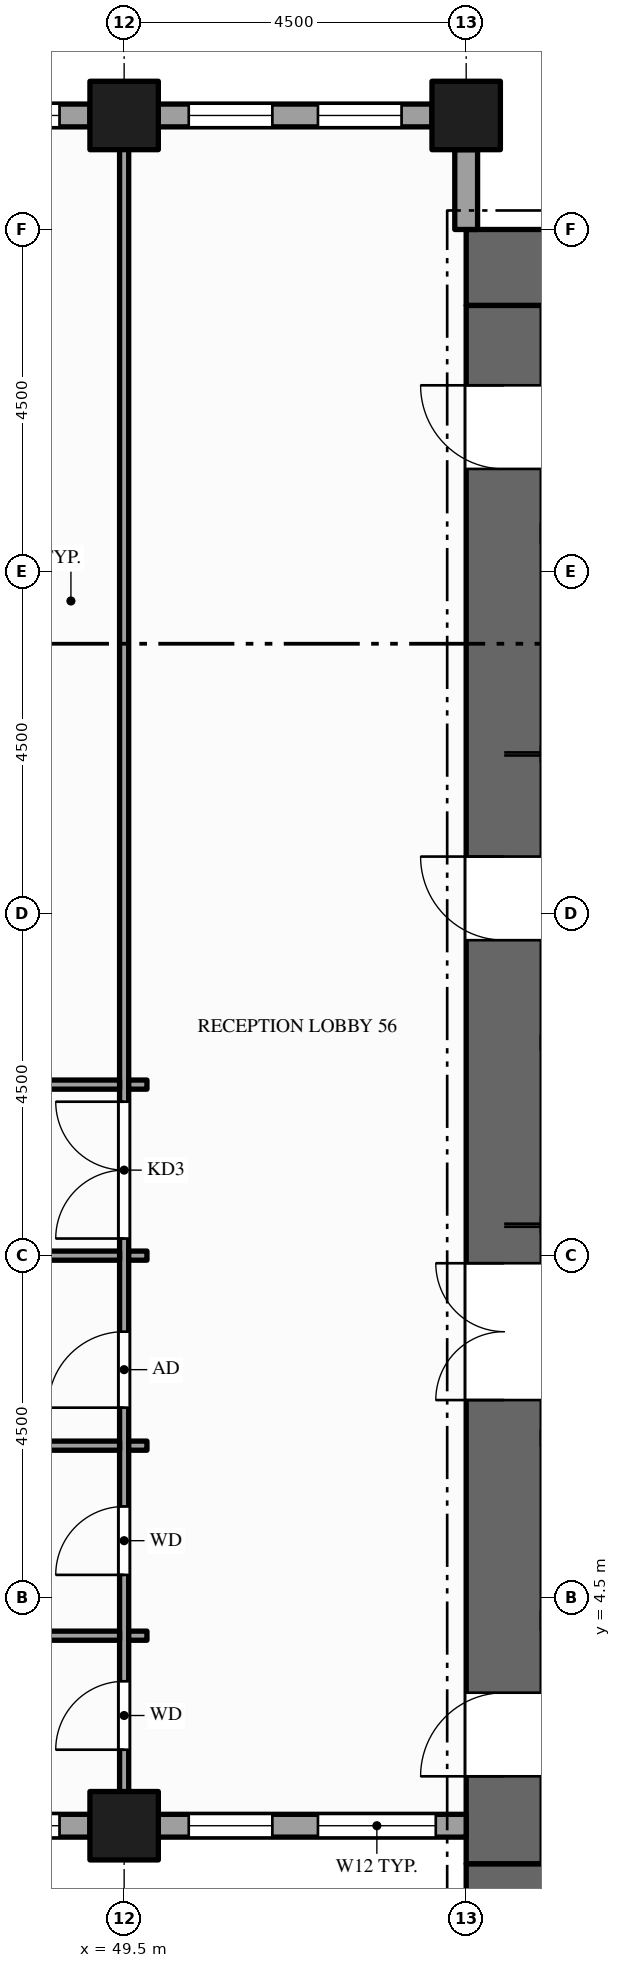
"""IFC4 building model, lengths in metres.
Left out: names, types, materials, properties, quantities, classifications, styles, units other than length and angle.
Written with IfcOpenShell. Run it as: python <this file> out.ifc"""

import sys

from ifc_helpers import new_model, si_unit, direction, frame, frame_2d, origin, origin_2d, place, context, subcontext, project, spatial, rectangle, hollow_rectangle, extrude, element, fill, save


model = new_model("IFC4")
c1 = context("Model", 3, precision=1e-05, world=origin(), true_north=direction((0.0, 1.0)))
c2 = subcontext(c1, "Body", "Model", "MODEL_VIEW")
j1 = project(units=[si_unit("LENGTHUNIT", "METRE"), si_unit("PLANEANGLEUNIT", "RADIAN")], contexts=[c1])
p1 = place(None, origin())
s1 = spatial("IfcSite", under=j1, at=p1, CompositionType="ELEMENT")
p2 = place(p1, origin())
s2 = spatial("IfcBuilding", under=s1, at=p2, CompositionType="ELEMENT")
p3 = place(p2, frame((0.0, 0.0, 151.0)))
s3 = spatial("IfcBuildingStorey", under=s2, at=p3, CompositionType="ELEMENT", Elevation=151.0)
for number, where, z_axis, x_axis in (
    (1, (67.5, 0.5, -0.15), (0.0, 0.0, 1.0), (-1.0, 0.0, 0.0)),
    (2, (54.0, 22.0, -0.15), (0.0, 0.0, 1.0), (1.0, 0.0, 0.0)),
):
    element("IfcWall", number, at=place(p3, frame(where, z_axis=z_axis, x_axis=x_axis)), inside=s3, PredefinedType="SHEAR", context=c2, shape_type="SweptSolid", body=[
        extrude(rectangle(XDim=13.5, YDim=1.0, at=frame_2d((6.75, 0.0))), origin(), (0.0, 0.0, 1.0), 4.0),
    ])
p4 = place(p3, frame((54.5, 1.0, -0.15), z_axis=(0.0, 0.0, 1.0), x_axis=(0.0, 1.0, 0.0)))
e3 = element("IfcWall", 3, at=p4, inside=s3, PredefinedType="SHEAR", context=c2, shape_type="SweptSolid", body=[
    extrude(rectangle(XDim=20.5, YDim=1.0, at=frame_2d((10.25, 0.0))), origin(), (0.0, 0.0, 1.0), 4.0),
])
p5 = place(p4, frame((6.1, 0.0, 0.15)))
e4 = element("IfcOpeningElement", 4, at=p5, cuts=e3, PredefinedType="OPENING", context=c2, shape_type="SweptSolid", body=[
    extrude(rectangle(XDim=1.8, YDim=2.1, at=frame_2d((0.9, 1.05))), frame((0.0, 0.51, 0.0), z_axis=(0.0, -1.0, 0.0), x_axis=(1.0, 0.0, 0.0)), (0.0, 0.0, 1.0), 1.02),
])
p6 = place(p4, frame((12.15, 0.0, 0.15)))
e5 = element("IfcOpeningElement", 5, at=p6, cuts=e3, PredefinedType="OPENING", context=c2, shape_type="SweptSolid", body=[
    extrude(rectangle(XDim=1.1, YDim=2.1, at=frame_2d((0.55, 1.05))), frame((0.0, 0.51, 0.0), z_axis=(0.0, -1.0, 0.0), x_axis=(1.0, 0.0, 0.0)), (0.0, 0.0, 1.0), 1.02),
])
p7 = place(p4, frame((1.15, 0.0, 0.15)))
e6 = element("IfcOpeningElement", 6, at=p7, cuts=e3, PredefinedType="OPENING", context=c2, shape_type="SweptSolid", body=[
    extrude(rectangle(XDim=1.1, YDim=2.1, at=frame_2d((0.55, 1.05))), frame((0.0, 0.51, 0.0), z_axis=(0.0, -1.0, 0.0), x_axis=(1.0, 0.0, 0.0)), (0.0, 0.0, 1.0), 1.02),
])
p8 = place(p4, frame((18.35, 0.0, 0.15)))
e7 = element("IfcOpeningElement", 7, at=p8, cuts=e3, PredefinedType="OPENING", context=c2, shape_type="SweptSolid", body=[
    extrude(rectangle(XDim=1.1, YDim=2.1, at=frame_2d((0.55, 1.05))), frame((0.0, 0.51, 0.0), z_axis=(0.0, -1.0, 0.0), x_axis=(1.0, 0.0, 0.0)), (0.0, 0.0, 1.0), 1.02),
])
for number, where, z_axis, x_axis in (
    (8, (49.5, 1.5, -0.15), (0.0, 0.0, 1.0), (1.0, 0.0, 0.0)),
    (9, (49.5, 24.0, -0.15), (0.0, 0.0, 1.0), (1.0, 0.0, 0.0)),
    (10, (54.0, 24.0, -0.15), (0.0, 0.0, 1.0), (1.0, 0.0, 0.0)),
):
    element("IfcColumn", number, at=place(p3, frame(where, z_axis=z_axis, x_axis=x_axis)), inside=s3, PredefinedType="COLUMN", context=c2, shape_type="SweptSolid", body=[
        extrude(hollow_rectangle(XDim=0.9, YDim=0.9, WallThickness=0.045, at=origin_2d()), origin(), (0.0, 0.0, 1.0), 4.0),
    ])
p9 = place(p3, frame((45.45, 1.5, 0.0), z_axis=(0.0, 0.0, 1.0), x_axis=(1.0, 0.0, 0.0)))
e11 = element("IfcWall", 11, at=p9, inside=s3, PredefinedType="STANDARD", context=c2, shape_type="SweptSolid", body=[
    extrude(rectangle(XDim=3.6, YDim=0.3, at=frame_2d((1.8, 0.0))), origin(), (0.0, 0.0, 1.0), 2.87),
])
p10 = place(p9, frame((0.4, 0.0, 0.9)))
e12 = element("IfcOpeningElement", 12, at=p10, cuts=e11, PredefinedType="OPENING", context=c2, shape_type="SweptSolid", body=[
    extrude(rectangle(XDim=1.1, YDim=1.75, at=frame_2d((0.55, 0.875))), frame((0.0, 0.16, 0.0), z_axis=(0.0, -1.0, 0.0), x_axis=(1.0, 0.0, 0.0)), (0.0, 0.0, 1.0), 0.32),
])
p11 = place(p9, frame((2.1, 0.0, 0.9)))
e13 = element("IfcOpeningElement", 13, at=p11, cuts=e11, PredefinedType="OPENING", context=c2, shape_type="SweptSolid", body=[
    extrude(rectangle(XDim=1.1, YDim=1.75, at=frame_2d((0.55, 0.875))), frame((0.0, 0.16, 0.0), z_axis=(0.0, -1.0, 0.0), x_axis=(1.0, 0.0, 0.0)), (0.0, 0.0, 1.0), 0.32),
])
p12 = place(p3, frame((49.95, 1.5, 0.0), z_axis=(0.0, 0.0, 1.0), x_axis=(1.0, 0.0, 0.0)))
e14 = element("IfcWall", 14, at=p12, inside=s3, PredefinedType="STANDARD", context=c2, shape_type="SweptSolid", body=[
    extrude(rectangle(XDim=4.05, YDim=0.3, at=frame_2d((2.025, 0.0))), origin(), (0.0, 0.0, 1.0), 2.87),
])
p13 = place(p12, frame((0.4, 0.0, 0.9)))
e15 = element("IfcOpeningElement", 15, at=p13, cuts=e14, PredefinedType="OPENING", context=c2, shape_type="SweptSolid", body=[
    extrude(rectangle(XDim=1.1, YDim=1.75, at=frame_2d((0.55, 0.875))), frame((0.0, 0.16, 0.0), z_axis=(0.0, -1.0, 0.0), x_axis=(1.0, 0.0, 0.0)), (0.0, 0.0, 1.0), 0.32),
])
p14 = place(p12, frame((2.1, 0.0, 0.9)))
e16 = element("IfcOpeningElement", 16, at=p14, cuts=e14, PredefinedType="OPENING", context=c2, shape_type="SweptSolid", body=[
    extrude(rectangle(XDim=1.55, YDim=1.75, at=frame_2d((0.775, 0.875))), frame((0.0, 0.16, 0.0), z_axis=(0.0, -1.0, 0.0), x_axis=(1.0, 0.0, 0.0)), (0.0, 0.0, 1.0), 0.32),
])
p15 = place(p3, frame((54.0, 22.5, 0.0), z_axis=(0.0, 0.0, 1.0), x_axis=(0.0, 1.0, 0.0)))
e17 = element("IfcWall", 17, at=p15, inside=s3, PredefinedType="STANDARD", context=c2, shape_type="SweptSolid", body=[
    extrude(rectangle(XDim=1.05, YDim=0.3, at=frame_2d((0.525, 0.0))), origin(), (0.0, 0.0, 1.0), 3.149),
])
p16 = place(p3, frame((53.55, 24.0, 0.0), z_axis=(0.0, 0.0, 1.0), x_axis=(-1.0, 0.0, 0.0)))
e18 = element("IfcWall", 18, at=p16, inside=s3, PredefinedType="STANDARD", context=c2, shape_type="SweptSolid", body=[
    extrude(rectangle(XDim=3.6, YDim=0.3, at=frame_2d((1.8, 0.0))), origin(), (0.0, 0.0, 1.0), 2.87),
])
p17 = place(p16, frame((0.4, 0.0, 0.9)))
e19 = element("IfcOpeningElement", 19, at=p17, cuts=e18, PredefinedType="OPENING", context=c2, shape_type="SweptSolid", body=[
    extrude(rectangle(XDim=1.1, YDim=1.75, at=frame_2d((0.55, 0.875))), frame((0.0, 0.16, 0.0), z_axis=(0.0, -1.0, 0.0), x_axis=(1.0, 0.0, 0.0)), (0.0, 0.0, 1.0), 0.32),
])
p18 = place(p16, frame((2.1, 0.0, 0.9)))
e20 = element("IfcOpeningElement", 20, at=p18, cuts=e18, PredefinedType="OPENING", context=c2, shape_type="SweptSolid", body=[
    extrude(rectangle(XDim=1.1, YDim=1.75, at=frame_2d((0.55, 0.875))), frame((0.0, 0.16, 0.0), z_axis=(0.0, -1.0, 0.0), x_axis=(1.0, 0.0, 0.0)), (0.0, 0.0, 1.0), 0.32),
])
p19 = place(p3, frame((49.05, 24.0, 0.0), z_axis=(0.0, 0.0, 1.0), x_axis=(-1.0, 0.0, 0.0)))
e21 = element("IfcWall", 21, at=p19, inside=s3, PredefinedType="STANDARD", context=c2, shape_type="SweptSolid", body=[
    extrude(rectangle(XDim=3.6, YDim=0.3, at=frame_2d((1.8, 0.0))), origin(), (0.0, 0.0, 1.0), 2.87),
])
p20 = place(p19, frame((0.4, 0.0, 0.9)))
e22 = element("IfcOpeningElement", 22, at=p20, cuts=e21, PredefinedType="OPENING", context=c2, shape_type="SweptSolid", body=[
    extrude(rectangle(XDim=1.1, YDim=1.75, at=frame_2d((0.55, 0.875))), frame((0.0, 0.16, 0.0), z_axis=(0.0, -1.0, 0.0), x_axis=(1.0, 0.0, 0.0)), (0.0, 0.0, 1.0), 0.32),
])
p21 = place(p19, frame((2.1, 0.0, 0.9)))
e23 = element("IfcOpeningElement", 23, at=p21, cuts=e21, PredefinedType="OPENING", context=c2, shape_type="SweptSolid", body=[
    extrude(rectangle(XDim=1.1, YDim=1.75, at=frame_2d((0.55, 0.875))), frame((0.0, 0.16, 0.0), z_axis=(0.0, -1.0, 0.0), x_axis=(1.0, 0.0, 0.0)), (0.0, 0.0, 1.0), 0.32),
])
p22 = place(p3, frame((49.5, 1.65, 0.0), z_axis=(0.0, 0.0, 1.0), x_axis=(0.0, 1.0, 0.0)))
e24 = element("IfcWall", 24, at=p22, inside=s3, PredefinedType="PARTITIONING", context=c2, shape_type="SweptSolid", body=[
    extrude(rectangle(XDim=22.2, YDim=0.12, at=frame_2d((11.1, 0.0))), origin(), (0.0, 0.0, 1.0), 2.87),
])
p23 = place(p22, frame((7.575, 0.0, 0.0)))
e25 = element("IfcOpeningElement", 25, at=p23, cuts=e24, PredefinedType="OPENING", context=c2, shape_type="SweptSolid", body=[
    extrude(rectangle(XDim=1.8, YDim=2.1, at=frame_2d((0.9, 1.05))), frame((0.0, 0.07, 0.0), z_axis=(0.0, -1.0, 0.0), x_axis=(1.0, 0.0, 0.0)), (0.0, 0.0, 1.0), 0.14),
])
p24 = place(p22, frame((0.85, 0.0, 0.0)))
e26 = element("IfcOpeningElement", 26, at=p24, cuts=e24, PredefinedType="OPENING", context=c2, shape_type="SweptSolid", body=[
    extrude(rectangle(XDim=0.9, YDim=2.1, at=frame_2d((0.45, 1.05))), frame((0.0, 0.07, 0.0), z_axis=(0.0, -1.0, 0.0), x_axis=(1.0, 0.0, 0.0)), (0.0, 0.0, 1.0), 0.14),
])
p25 = place(p22, frame((3.15, 0.0, 0.0)))
e27 = element("IfcOpeningElement", 27, at=p25, cuts=e24, PredefinedType="OPENING", context=c2, shape_type="SweptSolid", body=[
    extrude(rectangle(XDim=0.9, YDim=2.1, at=frame_2d((0.45, 1.05))), frame((0.0, 0.07, 0.0), z_axis=(0.0, -1.0, 0.0), x_axis=(1.0, 0.0, 0.0)), (0.0, 0.0, 1.0), 0.14),
])
p26 = place(p22, frame((5.35, 0.0, 0.0)))
e28 = element("IfcOpeningElement", 28, at=p26, cuts=e24, PredefinedType="OPENING", context=c2, shape_type="SweptSolid", body=[
    extrude(rectangle(XDim=1.0, YDim=2.1, at=frame_2d((0.5, 1.05))), frame((0.0, 0.07, 0.0), z_axis=(0.0, -1.0, 0.0), x_axis=(1.0, 0.0, 0.0)), (0.0, 0.0, 1.0), 0.14),
])
p27 = place(p3, frame((45.06, 4.0, 0.0), z_axis=(0.0, 0.0, 1.0), x_axis=(1.0, 0.0, 0.0)))
e29 = element("IfcWall", 29, at=p27, inside=s3, PredefinedType="PARTITIONING", context=c2, shape_type="SweptSolid", body=[
    extrude(rectangle(XDim=4.38, YDim=0.12, at=frame_2d((2.19, 0.0))), origin(), (0.0, 0.0, 1.0), 2.87),
])
p28 = place(p3, frame((49.56, 4.0, 0.0), z_axis=(0.0, 0.0, 1.0), x_axis=(1.0, 0.0, 0.0)))
e30 = element("IfcWall", 30, at=p28, inside=s3, PredefinedType="PARTITIONING", context=c2, shape_type="SweptSolid", body=[
    extrude(rectangle(XDim=0.24, YDim=0.12, at=frame_2d((0.12, 0.0))), origin(), (0.0, 0.0, 1.0), 2.87),
])
p29 = place(p3, frame((45.06, 6.5, 0.0), z_axis=(0.0, 0.0, 1.0), x_axis=(1.0, 0.0, 0.0)))
e31 = element("IfcWall", 31, at=p29, inside=s3, PredefinedType="PARTITIONING", context=c2, shape_type="SweptSolid", body=[
    extrude(rectangle(XDim=4.38, YDim=0.12, at=frame_2d((2.19, 0.0))), origin(), (0.0, 0.0, 1.0), 2.87),
])
p30 = place(p3, frame((49.56, 6.5, 0.0), z_axis=(0.0, 0.0, 1.0), x_axis=(1.0, 0.0, 0.0)))
e32 = element("IfcWall", 32, at=p30, inside=s3, PredefinedType="PARTITIONING", context=c2, shape_type="SweptSolid", body=[
    extrude(rectangle(XDim=0.24, YDim=0.12, at=frame_2d((0.12, 0.0))), origin(), (0.0, 0.0, 1.0), 2.87),
])
p31 = place(p3, frame((45.06, 9.0, 0.0), z_axis=(0.0, 0.0, 1.0), x_axis=(1.0, 0.0, 0.0)))
e33 = element("IfcWall", 33, at=p31, inside=s3, PredefinedType="PARTITIONING", context=c2, shape_type="SweptSolid", body=[
    extrude(rectangle(XDim=4.38, YDim=0.12, at=frame_2d((2.19, 0.0))), origin(), (0.0, 0.0, 1.0), 2.87),
])
p32 = place(p3, frame((49.56, 9.0, 0.0), z_axis=(0.0, 0.0, 1.0), x_axis=(1.0, 0.0, 0.0)))
e34 = element("IfcWall", 34, at=p32, inside=s3, PredefinedType="PARTITIONING", context=c2, shape_type="SweptSolid", body=[
    extrude(rectangle(XDim=0.24, YDim=0.12, at=frame_2d((0.12, 0.0))), origin(), (0.0, 0.0, 1.0), 2.87),
])
p33 = place(p3, frame((55.0, 9.4, 0.0), z_axis=(0.0, 0.0, 1.0), x_axis=(1.0, 0.0, 0.0)))
e35 = element("IfcWall", 35, at=p33, inside=s3, PredefinedType="SOLIDWALL", context=c2, shape_type="SweptSolid", body=[
    extrude(rectangle(XDim=2.3, YDim=0.2, at=frame_2d((1.15, 0.0))), origin(), (0.0, 0.0, 1.0), 3.85),
])
p34 = place(p33, frame((0.6, 0.0, 0.012)))
e36 = element("IfcOpeningElement", 36, at=p34, cuts=e35, PredefinedType="OPENING", context=c2, shape_type="SweptSolid", body=[
    extrude(rectangle(XDim=1.1, YDim=2.1, at=frame_2d((0.55, 1.05))), frame((0.0, 0.11, 0.0), z_axis=(0.0, -1.0, 0.0), x_axis=(1.0, 0.0, 0.0)), (0.0, 0.0, 1.0), 0.22),
])
p35 = place(p3, frame((45.06, 11.25, 0.0), z_axis=(0.0, 0.0, 1.0), x_axis=(1.0, 0.0, 0.0)))
e37 = element("IfcWall", 37, at=p35, inside=s3, PredefinedType="PARTITIONING", context=c2, shape_type="SweptSolid", body=[
    extrude(rectangle(XDim=4.38, YDim=0.12, at=frame_2d((2.19, 0.0))), origin(), (0.0, 0.0, 1.0), 2.87),
])
p36 = place(p35, frame((1.69, 0.0, 0.0)))
e38 = element("IfcOpeningElement", 38, at=p36, cuts=e37, PredefinedType="OPENING", context=c2, shape_type="SweptSolid", body=[
    extrude(rectangle(XDim=1.0, YDim=2.1, at=frame_2d((0.5, 1.05))), frame((0.0, 0.07, 0.0), z_axis=(0.0, -1.0, 0.0), x_axis=(1.0, 0.0, 0.0)), (0.0, 0.0, 1.0), 0.14),
])
p37 = place(p3, frame((49.56, 11.25, 0.0), z_axis=(0.0, 0.0, 1.0), x_axis=(1.0, 0.0, 0.0)))
e39 = element("IfcWall", 39, at=p37, inside=s3, PredefinedType="PARTITIONING", context=c2, shape_type="SweptSolid", body=[
    extrude(rectangle(XDim=0.24, YDim=0.12, at=frame_2d((0.12, 0.0))), origin(), (0.0, 0.0, 1.0), 2.87),
])
p38 = place(p3, frame((55.0, 11.8, 0.0), z_axis=(0.0, 0.0, 1.0), x_axis=(1.0, 0.0, 0.0)))
e40 = element("IfcWall", 40, at=p38, inside=s3, PredefinedType="SOLIDWALL", context=c2, shape_type="SweptSolid", body=[
    extrude(rectangle(XDim=2.3, YDim=0.2, at=frame_2d((1.15, 0.0))), origin(), (0.0, 0.0, 1.0), 3.85),
])
p39 = place(p3, frame((55.0, 15.6, 0.0), z_axis=(0.0, 0.0, 1.0), x_axis=(1.0, 0.0, 0.0)))
e41 = element("IfcWall", 41, at=p39, inside=s3, PredefinedType="SOLIDWALL", context=c2, shape_type="SweptSolid", body=[
    extrude(rectangle(XDim=2.3, YDim=0.2, at=frame_2d((1.15, 0.0))), origin(), (0.0, 0.0, 1.0), 3.85),
])
p40 = place(p39, frame((0.6, 0.0, 0.012)))
e42 = element("IfcOpeningElement", 42, at=p40, cuts=e41, PredefinedType="OPENING", context=c2, shape_type="SweptSolid", body=[
    extrude(rectangle(XDim=1.1, YDim=2.1, at=frame_2d((0.55, 1.05))), frame((0.0, 0.11, 0.0), z_axis=(0.0, -1.0, 0.0), x_axis=(1.0, 0.0, 0.0)), (0.0, 0.0, 1.0), 0.22),
])
p41 = place(p11, origin())
e43 = element("IfcWindow", 43, at=p41, inside=s3, PartitioningType="SINGLE_PANEL", PredefinedType="WINDOW", context=c2, shape_type="SweptSolid", body=[
    extrude(rectangle(XDim=1.1, YDim=1.75, at=frame_2d((0.55, 0.875))), frame((0.0, 0.03, 0.0), z_axis=(0.0, -1.0, 0.0), x_axis=(1.0, 0.0, 0.0)), (0.0, 0.0, 1.0), 0.06),
])
fill(e13, e43)
p42 = place(p13, origin())
e44 = element("IfcWindow", 44, at=p42, inside=s3, PartitioningType="SINGLE_PANEL", PredefinedType="WINDOW", context=c2, shape_type="SweptSolid", body=[
    extrude(rectangle(XDim=1.1, YDim=1.75, at=frame_2d((0.55, 0.875))), frame((0.0, 0.03, 0.0), z_axis=(0.0, -1.0, 0.0), x_axis=(1.0, 0.0, 0.0)), (0.0, 0.0, 1.0), 0.06),
])
fill(e15, e44)
p43 = place(p14, origin())
e45 = element("IfcWindow", 45, at=p43, inside=s3, PartitioningType="SINGLE_PANEL", PredefinedType="WINDOW", context=c2, shape_type="SweptSolid", body=[
    extrude(rectangle(XDim=1.55, YDim=1.75, at=frame_2d((0.775, 0.875))), frame((0.0, 0.03, 0.0), z_axis=(0.0, -1.0, 0.0), x_axis=(1.0, 0.0, 0.0)), (0.0, 0.0, 1.0), 0.06),
])
fill(e16, e45)
p44 = place(p17, origin())
e46 = element("IfcWindow", 46, at=p44, inside=s3, PartitioningType="SINGLE_PANEL", PredefinedType="WINDOW", context=c2, shape_type="SweptSolid", body=[
    extrude(rectangle(XDim=1.1, YDim=1.75, at=frame_2d((0.55, 0.875))), frame((0.0, 0.03, 0.0), z_axis=(0.0, -1.0, 0.0), x_axis=(1.0, 0.0, 0.0)), (0.0, 0.0, 1.0), 0.06),
])
fill(e19, e46)
p45 = place(p18, origin())
e47 = element("IfcWindow", 47, at=p45, inside=s3, PartitioningType="SINGLE_PANEL", PredefinedType="WINDOW", context=c2, shape_type="SweptSolid", body=[
    extrude(rectangle(XDim=1.1, YDim=1.75, at=frame_2d((0.55, 0.875))), frame((0.0, 0.03, 0.0), z_axis=(0.0, -1.0, 0.0), x_axis=(1.0, 0.0, 0.0)), (0.0, 0.0, 1.0), 0.06),
])
fill(e20, e47)
p46 = place(p20, origin())
e48 = element("IfcWindow", 48, at=p46, inside=s3, PartitioningType="SINGLE_PANEL", PredefinedType="WINDOW", context=c2, shape_type="SweptSolid", body=[
    extrude(rectangle(XDim=1.1, YDim=1.75, at=frame_2d((0.55, 0.875))), frame((0.0, 0.03, 0.0), z_axis=(0.0, -1.0, 0.0), x_axis=(1.0, 0.0, 0.0)), (0.0, 0.0, 1.0), 0.06),
])
fill(e22, e48)
p47 = place(p5, origin())
e49 = element("IfcDoor", 49, at=p47, inside=s3, OperationType="DOUBLE_DOOR_SINGLE_SWING", PredefinedType="DOOR", context=c2, shape_type="SweptSolid", body=[
    extrude(rectangle(XDim=1.8, YDim=2.1, at=frame_2d((0.9, 1.05))), frame((0.0, 0.025, 0.0), z_axis=(0.0, -1.0, 0.0), x_axis=(1.0, 0.0, 0.0)), (0.0, 0.0, 1.0), 0.05),
])
fill(e4, e49)
p48 = place(p6, origin())
e50 = element("IfcDoor", 50, at=p48, inside=s3, OperationType="SINGLE_SWING_RIGHT", PredefinedType="DOOR", context=c2, shape_type="SweptSolid", body=[
    extrude(rectangle(XDim=1.1, YDim=2.1, at=frame_2d((0.55, 1.05))), frame((0.0, 0.025, 0.0), z_axis=(0.0, -1.0, 0.0), x_axis=(1.0, 0.0, 0.0)), (0.0, 0.0, 1.0), 0.05),
])
fill(e5, e50)
p49 = place(p7, origin())
e51 = element("IfcDoor", 51, at=p49, inside=s3, OperationType="SINGLE_SWING_LEFT", PredefinedType="DOOR", context=c2, shape_type="SweptSolid", body=[
    extrude(rectangle(XDim=1.1, YDim=2.1, at=frame_2d((0.55, 1.05))), frame((0.0, 0.025, 0.0), z_axis=(0.0, -1.0, 0.0), x_axis=(1.0, 0.0, 0.0)), (0.0, 0.0, 1.0), 0.05),
])
fill(e6, e51)
p50 = place(p8, origin())
e52 = element("IfcDoor", 52, at=p50, inside=s3, OperationType="SINGLE_SWING_RIGHT", PredefinedType="DOOR", context=c2, shape_type="SweptSolid", body=[
    extrude(rectangle(XDim=1.1, YDim=2.1, at=frame_2d((0.55, 1.05))), frame((0.0, 0.025, 0.0), z_axis=(0.0, -1.0, 0.0), x_axis=(1.0, 0.0, 0.0)), (0.0, 0.0, 1.0), 0.05),
])
fill(e7, e52)
p51 = place(p23, origin())
e53 = element("IfcDoor", 53, at=p51, inside=s3, OperationType="DOUBLE_DOOR_SINGLE_SWING", PredefinedType="DOOR", context=c2, shape_type="SweptSolid", body=[
    extrude(rectangle(XDim=1.8, YDim=2.1, at=frame_2d((0.9, 1.05))), frame((0.0, 0.025, 0.0), z_axis=(0.0, -1.0, 0.0), x_axis=(1.0, 0.0, 0.0)), (0.0, 0.0, 1.0), 0.05),
])
fill(e25, e53)
p52 = place(p24, origin())
e54 = element("IfcDoor", 54, at=p52, inside=s3, OperationType="SINGLE_SWING_LEFT", PredefinedType="DOOR", context=c2, shape_type="SweptSolid", body=[
    extrude(rectangle(XDim=0.9, YDim=2.1, at=frame_2d((0.45, 1.05))), frame((0.0, 0.025, 0.0), z_axis=(0.0, -1.0, 0.0), x_axis=(1.0, 0.0, 0.0)), (0.0, 0.0, 1.0), 0.05),
])
fill(e26, e54)
p53 = place(p25, origin())
e55 = element("IfcDoor", 55, at=p53, inside=s3, OperationType="SINGLE_SWING_LEFT", PredefinedType="DOOR", context=c2, shape_type="SweptSolid", body=[
    extrude(rectangle(XDim=0.9, YDim=2.1, at=frame_2d((0.45, 1.05))), frame((0.0, 0.025, 0.0), z_axis=(0.0, -1.0, 0.0), x_axis=(1.0, 0.0, 0.0)), (0.0, 0.0, 1.0), 0.05),
])
fill(e27, e55)
p54 = place(p26, origin())
e56 = element("IfcDoor", 56, at=p54, inside=s3, OperationType="SINGLE_SWING_LEFT", PredefinedType="DOOR", context=c2, shape_type="SweptSolid", body=[
    extrude(rectangle(XDim=1.0, YDim=2.1, at=frame_2d((0.5, 1.05))), frame((0.0, 0.025, 0.0), z_axis=(0.0, -1.0, 0.0), x_axis=(1.0, 0.0, 0.0)), (0.0, 0.0, 1.0), 0.05),
])
fill(e28, e56)
save(model, sys.argv[1])
